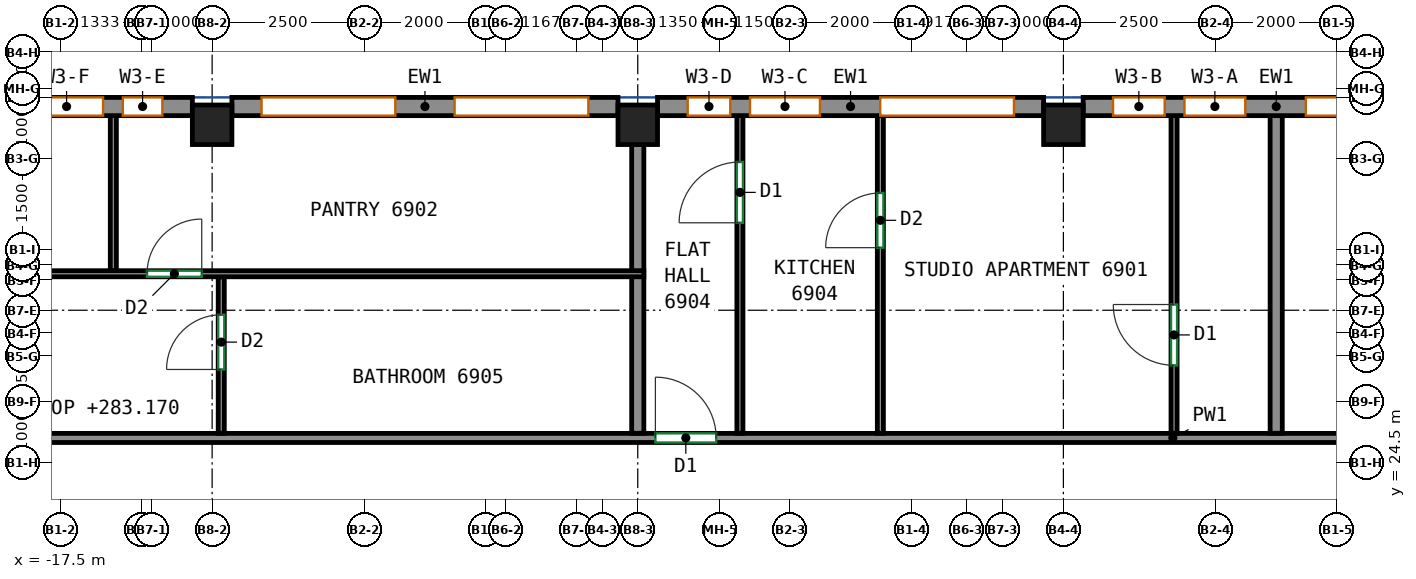
"""IFC4 building model, lengths in metres.
Left out: names, types, materials, properties, quantities, classifications, styles, units other than length and angle.
Written with IfcOpenShell. Run it as: python <this file> out.ifc"""

import sys

from ifc_helpers import new_model, si_unit, direction, frame, frame_2d, origin, origin_2d, place, context, subcontext, project, spatial, rectangle, extrude, source, transform, mapped, element, fill, save


model = new_model("IFC4")
c1 = context("Model", 3, precision=1e-05, world=origin(), true_north=direction((0.0, 1.0)))
c2 = subcontext(c1, "Body", "Model", "MODEL_VIEW")
j1 = project(units=[si_unit("LENGTHUNIT", "METRE"), si_unit("PLANEANGLEUNIT", "RADIAN")], contexts=[c1])
p1 = place(None, origin())
s1 = spatial("IfcSite", under=j1, at=p1, CompositionType="ELEMENT")
p2 = place(p1, origin())
s2 = spatial("IfcBuilding", under=s1, at=p2, CompositionType="ELEMENT")
p3 = place(p2, frame((0.0, 0.0, 280.6)))
s3 = spatial("IfcBuildingStorey", under=s2, at=p3, CompositionType="ELEMENT", Elevation=280.6)
m1 = source(origin(), c2, "Body", "SweptSolid", [
    extrude(rectangle(XDim=0.65, YDim=0.65, at=origin_2d()), origin(), (0.0, 0.0, 1.0), 3.12),
])
for number, where, z_axis, x_axis in (
    (1, (-15.0, 30.05, 0.0), (0.0, 0.0, 1.0), (1.0, 0.0, 0.0)),
    (2, (-8.0, 30.05, 0.0), (0.0, 0.0, 1.0), (1.0, 0.0, 0.0)),
    (3, (-1.0, 30.05, 0.0), (0.0, 0.0, 1.0), (1.0, 0.0, 0.0)),
):
    element("IfcColumn", number, at=place(p3, frame(where, z_axis=z_axis, x_axis=x_axis)), inside=s3, PredefinedType="COLUMN", context=c2, shape_type="MappedRepresentation", body=[
        mapped(m1, transform((0.0, 0.0, 0.0))),
    ])
m2 = source(origin(), c2, "Body", "SweptSolid", [
    extrude(rectangle(XDim=6.35, YDim=0.3, at=frame_2d((3.175, 0.0))), origin(), (0.0, 0.0, 1.0), 3.12),
])
p4 = place(p3, frame((5.675, 30.35, 0.0), z_axis=(0.0, 0.0, 1.0), x_axis=(-1.0, 0.0, 0.0)))
e4 = element("IfcWall", 4, at=p4, inside=s3, PredefinedType="SOLIDWALL", context=c2, shape_type="MappedRepresentation", body=[
    mapped(m2, transform((0.0, 0.0, 0.0))),
])
p5 = place(p4, frame((0.488, 0.0, 0.8)))
e5 = element("IfcOpeningElement", 5, at=p5, cuts=e4, PredefinedType="OPENING", context=c2, shape_type="SweptSolid", body=[
    extrude(rectangle(XDim=2.2, YDim=2.05, at=frame_2d((1.1, 1.025))), frame((0.0, 0.16, 0.0), z_axis=(0.0, -1.0, 0.0), x_axis=(1.0, 0.0, 0.0)), (0.0, 0.0, 1.0), 0.32),
])
p6 = place(p4, frame((3.684, 0.0, 0.8)))
e6 = element("IfcOpeningElement", 6, at=p6, cuts=e4, PredefinedType="OPENING", context=c2, shape_type="SweptSolid", body=[
    extrude(rectangle(XDim=1.0, YDim=2.05, at=frame_2d((0.5, 1.025))), frame((0.0, 0.16, 0.0), z_axis=(0.0, -1.0, 0.0), x_axis=(1.0, 0.0, 0.0)), (0.0, 0.0, 1.0), 0.32),
])
p7 = place(p4, frame((5.009, 0.0, 0.8)))
e7 = element("IfcOpeningElement", 7, at=p7, cuts=e4, PredefinedType="OPENING", context=c2, shape_type="SweptSolid", body=[
    extrude(rectangle(XDim=0.85, YDim=2.05, at=frame_2d((0.425, 1.025))), frame((0.0, 0.16, 0.0), z_axis=(0.0, -1.0, 0.0), x_axis=(1.0, 0.0, 0.0)), (0.0, 0.0, 1.0), 0.32),
])
p8 = place(p3, frame((-1.325, 30.35, 0.0), z_axis=(0.0, 0.0, 1.0), x_axis=(-1.0, 0.0, 0.0)))
e8 = element("IfcWall", 8, at=p8, inside=s3, PredefinedType="SOLIDWALL", context=c2, shape_type="MappedRepresentation", body=[
    mapped(m2, transform((0.0, 0.0, 0.0))),
])
p9 = place(p8, frame((0.488, 0.0, 0.8)))
e9 = element("IfcOpeningElement", 9, at=p9, cuts=e8, PredefinedType="OPENING", context=c2, shape_type="SweptSolid", body=[
    extrude(rectangle(XDim=2.2, YDim=2.05, at=frame_2d((1.1, 1.025))), frame((0.0, 0.16, 0.0), z_axis=(0.0, -1.0, 0.0), x_axis=(1.0, 0.0, 0.0)), (0.0, 0.0, 1.0), 0.32),
])
p10 = place(p8, frame((3.679, 0.0, 0.8)))
e10 = element("IfcOpeningElement", 10, at=p10, cuts=e8, PredefinedType="OPENING", context=c2, shape_type="SweptSolid", body=[
    extrude(rectangle(XDim=1.15, YDim=2.05, at=frame_2d((0.575, 1.025))), frame((0.0, 0.16, 0.0), z_axis=(0.0, -1.0, 0.0), x_axis=(1.0, 0.0, 0.0)), (0.0, 0.0, 1.0), 0.32),
])
p11 = place(p8, frame((5.154, 0.0, 0.8)))
e11 = element("IfcOpeningElement", 11, at=p11, cuts=e8, PredefinedType="OPENING", context=c2, shape_type="SweptSolid", body=[
    extrude(rectangle(XDim=0.7, YDim=2.05, at=frame_2d((0.35, 1.025))), frame((0.0, 0.16, 0.0), z_axis=(0.0, -1.0, 0.0), x_axis=(1.0, 0.0, 0.0)), (0.0, 0.0, 1.0), 0.32),
])
p12 = place(p3, frame((-8.325, 30.35, 0.0), z_axis=(0.0, 0.0, 1.0), x_axis=(-1.0, 0.0, 0.0)))
e12 = element("IfcWall", 12, at=p12, inside=s3, PredefinedType="SOLIDWALL", context=c2, shape_type="MappedRepresentation", body=[
    mapped(m2, transform((0.0, 0.0, 0.0))),
])
p13 = place(p12, frame((0.488, 0.0, 0.8)))
e13 = element("IfcOpeningElement", 13, at=p13, cuts=e12, PredefinedType="OPENING", context=c2, shape_type="SweptSolid", body=[
    extrude(rectangle(XDim=2.2, YDim=2.05, at=frame_2d((1.1, 1.025))), frame((0.0, 0.16, 0.0), z_axis=(0.0, -1.0, 0.0), x_axis=(1.0, 0.0, 0.0)), (0.0, 0.0, 1.0), 0.32),
])
p14 = place(p12, frame((3.663, 0.0, 0.8)))
e14 = element("IfcOpeningElement", 14, at=p14, cuts=e12, PredefinedType="OPENING", context=c2, shape_type="SweptSolid", body=[
    extrude(rectangle(XDim=2.2, YDim=2.05, at=frame_2d((1.1, 1.025))), frame((0.0, 0.16, 0.0), z_axis=(0.0, -1.0, 0.0), x_axis=(1.0, 0.0, 0.0)), (0.0, 0.0, 1.0), 0.32),
])
p15 = place(p3, frame((-15.325, 30.35, 0.0), z_axis=(0.0, 0.0, 1.0), x_axis=(-1.0, 0.0, 0.0)))
e15 = element("IfcWall", 15, at=p15, inside=s3, PredefinedType="SOLIDWALL", context=c2, shape_type="MappedRepresentation", body=[
    mapped(m2, transform((0.0, 0.0, 0.0))),
])
p16 = place(p15, frame((0.494, 0.0, 0.8)))
e16 = element("IfcOpeningElement", 16, at=p16, cuts=e15, PredefinedType="OPENING", context=c2, shape_type="SweptSolid", body=[
    extrude(rectangle(XDim=0.65, YDim=2.05, at=frame_2d((0.325, 1.025))), frame((0.0, 0.16, 0.0), z_axis=(0.0, -1.0, 0.0), x_axis=(1.0, 0.0, 0.0)), (0.0, 0.0, 1.0), 0.32),
])
p17 = place(p15, frame((3.663, 0.0, 0.8)))
e17 = element("IfcOpeningElement", 17, at=p17, cuts=e15, PredefinedType="OPENING", context=c2, shape_type="SweptSolid", body=[
    extrude(rectangle(XDim=2.2, YDim=2.05, at=frame_2d((1.1, 1.025))), frame((0.0, 0.16, 0.0), z_axis=(0.0, -1.0, 0.0), x_axis=(1.0, 0.0, 0.0)), (0.0, 0.0, 1.0), 0.32),
])
p18 = place(p15, frame((1.469, 0.0, 0.8)))
e18 = element("IfcOpeningElement", 18, at=p18, cuts=e15, PredefinedType="OPENING", context=c2, shape_type="SweptSolid", body=[
    extrude(rectangle(XDim=1.2, YDim=2.05, at=frame_2d((0.6, 1.025))), frame((0.0, 0.16, 0.0), z_axis=(0.0, -1.0, 0.0), x_axis=(1.0, 0.0, 0.0)), (0.0, 0.0, 1.0), 0.32),
])
p19 = place(p3, frame((-19.075, 24.9, 0.0), z_axis=(0.0, 0.0, 1.0), x_axis=(1.0, 0.0, 0.0)))
e19 = element("IfcWall", 19, at=p19, inside=s3, PredefinedType="PARTITIONING", context=c2, shape_type="SweptSolid", body=[
    extrude(rectangle(XDim=39.75, YDim=0.15, at=frame_2d((19.875, 0.0))), origin(), (0.0, 0.0, 1.0), 3.12),
])
p20 = place(p19, frame((11.365, 0.0, 0.0)))
e20 = element("IfcOpeningElement", 20, at=p20, cuts=e19, PredefinedType="OPENING", context=c2, shape_type="SweptSolid", body=[
    extrude(rectangle(XDim=1.0, YDim=2.1, at=frame_2d((0.5, 1.05))), frame((0.0, 0.085, 0.0), z_axis=(0.0, -1.0, 0.0), x_axis=(1.0, 0.0, 0.0)), (0.0, 0.0, 1.0), 0.17),
])
p21 = place(p19, frame((33.379, 0.0, 0.0)))
e21 = element("IfcOpeningElement", 21, at=p21, cuts=e19, PredefinedType="OPENING", context=c2, shape_type="SweptSolid", body=[
    extrude(rectangle(XDim=0.9, YDim=2.1, at=frame_2d((0.45, 1.05))), frame((0.0, 0.085, 0.0), z_axis=(0.0, -1.0, 0.0), x_axis=(1.0, 0.0, 0.0)), (0.0, 0.0, 1.0), 0.17),
])
p22 = place(p3, frame((2.5, 30.25, 0.0), z_axis=(0.0, 0.0, 1.0), x_axis=(0.0, -1.0, 0.0)))
e22 = element("IfcWall", 22, at=p22, inside=s3, PredefinedType="PARTITIONING", context=c2, shape_type="SweptSolid", body=[
    extrude(rectangle(XDim=5.273, YDim=0.2, at=frame_2d((2.636, 0.0))), origin(), (0.0, 0.0, 1.0), 3.12),
])
p23 = place(p3, frame((-6.32, 24.977, 0.0), z_axis=(0.0, 0.0, 1.0), x_axis=(0.0, 1.0, 0.0)))
e23 = element("IfcWall", 23, at=p23, inside=s3, PredefinedType="PARTITIONING", context=c2, shape_type="SweptSolid", body=[
    extrude(rectangle(XDim=5.273, YDim=0.1, at=frame_2d((2.636, 0.0))), origin(), (0.0, 0.0, 1.0), 3.12),
])
p24 = place(p23, frame((3.461, 0.0, 0.0)))
e24 = element("IfcOpeningElement", 24, at=p24, cuts=e23, PredefinedType="OPENING", context=c2, shape_type="SweptSolid", body=[
    extrude(rectangle(XDim=1.0, YDim=2.1, at=frame_2d((0.5, 1.05))), frame((0.0, 0.06, 0.0), z_axis=(0.0, -1.0, 0.0), x_axis=(1.0, 0.0, 0.0)), (0.0, 0.0, 1.0), 0.12),
])
p25 = place(p3, frame((-8.0, 24.977, 0.0), z_axis=(0.0, 0.0, 1.0), x_axis=(0.0, 1.0, 0.0)))
e25 = element("IfcWall", 25, at=p25, inside=s3, PredefinedType="PARTITIONING", context=c2, shape_type="SweptSolid", body=[
    extrude(rectangle(XDim=2.583, YDim=0.2, at=frame_2d((1.292, 0.0))), origin(), (0.0, 0.0, 1.0), 3.12),
])
p26 = place(p3, frame((-8.0, 27.642, 0.0), z_axis=(0.0, 0.0, 1.0), x_axis=(0.0, 1.0, 0.0)))
e26 = element("IfcWall", 26, at=p26, inside=s3, PredefinedType="PARTITIONING", context=c2, shape_type="SweptSolid", body=[
    extrude(rectangle(XDim=2.083, YDim=0.2, at=frame_2d((1.042, 0.0))), origin(), (0.0, 0.0, 1.0), 3.12),
])
p27 = place(p3, frame((-4.01, 24.977, 0.0), z_axis=(0.0, 0.0, 1.0), x_axis=(0.0, 1.0, 0.0)))
e27 = element("IfcWall", 27, at=p27, inside=s3, PredefinedType="PARTITIONING", context=c2, shape_type="SweptSolid", body=[
    extrude(rectangle(XDim=5.273, YDim=0.1, at=frame_2d((2.636, 0.0))), origin(), (0.0, 0.0, 1.0), 3.12),
])
p28 = place(p27, frame((3.052, 0.0, 0.0)))
e28 = element("IfcOpeningElement", 28, at=p28, cuts=e27, PredefinedType="OPENING", context=c2, shape_type="SweptSolid", body=[
    extrude(rectangle(XDim=0.9, YDim=2.1, at=frame_2d((0.45, 1.05))), frame((0.0, 0.06, 0.0), z_axis=(0.0, -1.0, 0.0), x_axis=(1.0, 0.0, 0.0)), (0.0, 0.0, 1.0), 0.12),
])
p29 = place(p3, frame((0.82, 24.977, 0.0), z_axis=(0.0, 0.0, 1.0), x_axis=(0.0, 1.0, 0.0)))
e29 = element("IfcWall", 29, at=p29, inside=s3, PredefinedType="PARTITIONING", context=c2, shape_type="SweptSolid", body=[
    extrude(rectangle(XDim=5.273, YDim=0.1, at=frame_2d((2.636, 0.0))), origin(), (0.0, 0.0, 1.0), 3.12),
])
p30 = place(p29, frame((1.117, 0.0, 0.0)))
e30 = element("IfcOpeningElement", 30, at=p30, cuts=e29, PredefinedType="OPENING", context=c2, shape_type="SweptSolid", body=[
    extrude(rectangle(XDim=1.0, YDim=2.1, at=frame_2d((0.5, 1.05))), frame((0.0, 0.06, 0.0), z_axis=(0.0, -1.0, 0.0), x_axis=(1.0, 0.0, 0.0)), (0.0, 0.0, 1.0), 0.12),
])
p31 = place(p3, frame((-14.85, 24.977, 0.0), z_axis=(0.0, 0.0, 1.0), x_axis=(0.0, 1.0, 0.0)))
e31 = element("IfcWall", 31, at=p31, inside=s3, PredefinedType="PARTITIONING", context=c2, shape_type="SweptSolid", body=[
    extrude(rectangle(XDim=2.573, YDim=0.1, at=frame_2d((1.287, 0.0))), origin(), (0.0, 0.0, 1.0), 3.12),
])
p32 = place(p31, frame((1.049, 0.0, 0.0)))
e32 = element("IfcOpeningElement", 32, at=p32, cuts=e31, PredefinedType="OPENING", context=c2, shape_type="SweptSolid", body=[
    extrude(rectangle(XDim=0.9, YDim=2.1, at=frame_2d((0.45, 1.05))), frame((0.0, 0.06, 0.0), z_axis=(0.0, -1.0, 0.0), x_axis=(1.0, 0.0, 0.0)), (0.0, 0.0, 1.0), 0.12),
])
p33 = place(p3, frame((-21.75, 27.6, 0.0), z_axis=(0.0, 0.0, 1.0), x_axis=(1.0, 0.0, 0.0)))
e33 = element("IfcWall", 33, at=p33, inside=s3, PredefinedType="PARTITIONING", context=c2, shape_type="SweptSolid", body=[
    extrude(rectangle(XDim=13.85, YDim=0.1, at=frame_2d((6.925, 0.0))), origin(), (0.0, 0.0, 1.0), 3.12),
])
p34 = place(p33, frame((5.679, 0.0, 0.0)))
e34 = element("IfcOpeningElement", 34, at=p34, cuts=e33, PredefinedType="OPENING", context=c2, shape_type="SweptSolid", body=[
    extrude(rectangle(XDim=0.9, YDim=2.1, at=frame_2d((0.45, 1.05))), frame((0.0, 0.06, 0.0), z_axis=(0.0, -1.0, 0.0), x_axis=(1.0, 0.0, 0.0)), (0.0, 0.0, 1.0), 0.12),
])
p35 = place(p3, frame((-16.625, 27.652, 0.0), z_axis=(0.0, 0.0, 1.0), x_axis=(0.0, 1.0, 0.0)))
e35 = element("IfcWall", 35, at=p35, inside=s3, PredefinedType="PARTITIONING", context=c2, shape_type="SweptSolid", body=[
    extrude(rectangle(XDim=2.598, YDim=0.1, at=frame_2d((1.299, 0.0))), origin(), (0.0, 0.0, 1.0), 3.12),
])
p36 = place(p5, origin())
e36 = element("IfcWindow", 36, at=p36, inside=s3, PartitioningType="SINGLE_PANEL", PredefinedType="WINDOW", context=c2, shape_type="SweptSolid", body=[
    extrude(rectangle(XDim=2.2, YDim=2.05, at=frame_2d((1.1, 1.025))), frame((0.0, 0.03, 0.0), z_axis=(0.0, -1.0, 0.0), x_axis=(1.0, 0.0, 0.0)), (0.0, 0.0, 1.0), 0.06),
])
fill(e5, e36)
p37 = place(p6, origin())
e37 = element("IfcWindow", 37, at=p37, inside=s3, PartitioningType="SINGLE_PANEL", PredefinedType="WINDOW", context=c2, shape_type="SweptSolid", body=[
    extrude(rectangle(XDim=1.0, YDim=2.05, at=frame_2d((0.5, 1.025))), frame((0.0, 0.03, 0.0), z_axis=(0.0, -1.0, 0.0), x_axis=(1.0, 0.0, 0.0)), (0.0, 0.0, 1.0), 0.06),
])
fill(e6, e37)
p38 = place(p9, origin())
e38 = element("IfcWindow", 38, at=p38, inside=s3, PartitioningType="SINGLE_PANEL", PredefinedType="WINDOW", context=c2, shape_type="SweptSolid", body=[
    extrude(rectangle(XDim=2.2, YDim=2.05, at=frame_2d((1.1, 1.025))), frame((0.0, 0.03, 0.0), z_axis=(0.0, -1.0, 0.0), x_axis=(1.0, 0.0, 0.0)), (0.0, 0.0, 1.0), 0.06),
])
fill(e9, e38)
p39 = place(p10, origin())
e39 = element("IfcWindow", 39, at=p39, inside=s3, PartitioningType="SINGLE_PANEL", PredefinedType="WINDOW", context=c2, shape_type="SweptSolid", body=[
    extrude(rectangle(XDim=1.15, YDim=2.05, at=frame_2d((0.575, 1.025))), frame((0.0, 0.03, 0.0), z_axis=(0.0, -1.0, 0.0), x_axis=(1.0, 0.0, 0.0)), (0.0, 0.0, 1.0), 0.06),
])
fill(e10, e39)
p40 = place(p13, origin())
e40 = element("IfcWindow", 40, at=p40, inside=s3, PartitioningType="SINGLE_PANEL", PredefinedType="WINDOW", context=c2, shape_type="SweptSolid", body=[
    extrude(rectangle(XDim=2.2, YDim=2.05, at=frame_2d((1.1, 1.025))), frame((0.0, 0.03, 0.0), z_axis=(0.0, -1.0, 0.0), x_axis=(1.0, 0.0, 0.0)), (0.0, 0.0, 1.0), 0.06),
])
fill(e13, e40)
p41 = place(p14, origin())
e41 = element("IfcWindow", 41, at=p41, inside=s3, PartitioningType="SINGLE_PANEL", PredefinedType="WINDOW", context=c2, shape_type="SweptSolid", body=[
    extrude(rectangle(XDim=2.2, YDim=2.05, at=frame_2d((1.1, 1.025))), frame((0.0, 0.03, 0.0), z_axis=(0.0, -1.0, 0.0), x_axis=(1.0, 0.0, 0.0)), (0.0, 0.0, 1.0), 0.06),
])
fill(e14, e41)
p42 = place(p16, origin())
e42 = element("IfcWindow", 42, at=p42, inside=s3, PartitioningType="SINGLE_PANEL", PredefinedType="WINDOW", context=c2, shape_type="SweptSolid", body=[
    extrude(rectangle(XDim=0.65, YDim=2.05, at=frame_2d((0.325, 1.025))), frame((0.0, 0.03, 0.0), z_axis=(0.0, -1.0, 0.0), x_axis=(1.0, 0.0, 0.0)), (0.0, 0.0, 1.0), 0.06),
])
fill(e16, e42)
p43 = place(p20, origin())
e43 = element("IfcDoor", 43, at=p43, inside=s3, OperationType="SINGLE_SWING_LEFT", PredefinedType="DOOR", context=c2, shape_type="SweptSolid", body=[
    extrude(rectangle(XDim=1.0, YDim=2.1, at=frame_2d((0.5, 1.05))), frame((0.0, 0.025, 0.0), z_axis=(0.0, -1.0, 0.0), x_axis=(1.0, 0.0, 0.0)), (0.0, 0.0, 1.0), 0.05),
])
fill(e20, e43)
p44 = place(p32, origin())
e44 = element("IfcDoor", 44, at=p44, inside=s3, OperationType="SINGLE_SWING_LEFT", PredefinedType="DOOR", context=c2, shape_type="SweptSolid", body=[
    extrude(rectangle(XDim=0.9, YDim=2.1, at=frame_2d((0.45, 1.05))), frame((0.0, 0.025, 0.0), z_axis=(0.0, -1.0, 0.0), x_axis=(1.0, 0.0, 0.0)), (0.0, 0.0, 1.0), 0.05),
])
fill(e32, e44)
p45 = place(p30, origin())
e45 = element("IfcDoor", 45, at=p45, inside=s3, OperationType="SINGLE_SWING_RIGHT", PredefinedType="DOOR", context=c2, shape_type="SweptSolid", body=[
    extrude(rectangle(XDim=1.0, YDim=2.1, at=frame_2d((0.5, 1.05))), frame((0.0, 0.025, 0.0), z_axis=(0.0, -1.0, 0.0), x_axis=(1.0, 0.0, 0.0)), (0.0, 0.0, 1.0), 0.05),
])
fill(e30, e45)
p46 = place(p34, origin())
e46 = element("IfcDoor", 46, at=p46, inside=s3, OperationType="SINGLE_SWING_RIGHT", PredefinedType="DOOR", context=c2, shape_type="SweptSolid", body=[
    extrude(rectangle(XDim=0.9, YDim=2.1, at=frame_2d((0.45, 1.05))), frame((0.0, 0.025, 0.0), z_axis=(0.0, -1.0, 0.0), x_axis=(1.0, 0.0, 0.0)), (0.0, 0.0, 1.0), 0.05),
])
fill(e34, e46)
p47 = place(p28, origin())
e47 = element("IfcDoor", 47, at=p47, inside=s3, OperationType="SINGLE_SWING_LEFT", PredefinedType="DOOR", context=c2, shape_type="SweptSolid", body=[
    extrude(rectangle(XDim=0.9, YDim=2.1, at=frame_2d((0.45, 1.05))), frame((0.0, 0.025, 0.0), z_axis=(0.0, -1.0, 0.0), x_axis=(1.0, 0.0, 0.0)), (0.0, 0.0, 1.0), 0.05),
])
fill(e28, e47)
p48 = place(p24, origin())
e48 = element("IfcDoor", 48, at=p48, inside=s3, OperationType="SINGLE_SWING_LEFT", PredefinedType="DOOR", context=c2, shape_type="SweptSolid", body=[
    extrude(rectangle(XDim=1.0, YDim=2.1, at=frame_2d((0.5, 1.05))), frame((0.0, 0.025, 0.0), z_axis=(0.0, -1.0, 0.0), x_axis=(1.0, 0.0, 0.0)), (0.0, 0.0, 1.0), 0.05),
])
fill(e24, e48)
p49 = place(p7, origin())
e49 = element("IfcWindow", 49, at=p49, inside=s3, PartitioningType="SINGLE_PANEL", PredefinedType="WINDOW", context=c2, shape_type="SweptSolid", body=[
    extrude(rectangle(XDim=0.85, YDim=2.05, at=frame_2d((0.425, 1.025))), frame((0.0, 0.03, 0.0), z_axis=(0.0, -1.0, 0.0), x_axis=(1.0, 0.0, 0.0)), (0.0, 0.0, 1.0), 0.06),
])
fill(e7, e49)
p50 = place(p11, origin())
e50 = element("IfcWindow", 50, at=p50, inside=s3, PartitioningType="SINGLE_PANEL", PredefinedType="WINDOW", context=c2, shape_type="SweptSolid", body=[
    extrude(rectangle(XDim=0.7, YDim=2.05, at=frame_2d((0.35, 1.025))), frame((0.0, 0.03, 0.0), z_axis=(0.0, -1.0, 0.0), x_axis=(1.0, 0.0, 0.0)), (0.0, 0.0, 1.0), 0.06),
])
fill(e11, e50)
p51 = place(p18, origin())
e51 = element("IfcWindow", 51, at=p51, inside=s3, PartitioningType="SINGLE_PANEL", PredefinedType="WINDOW", context=c2, shape_type="SweptSolid", body=[
    extrude(rectangle(XDim=1.2, YDim=2.05, at=frame_2d((0.6, 1.025))), frame((0.0, 0.03, 0.0), z_axis=(0.0, -1.0, 0.0), x_axis=(1.0, 0.0, 0.0)), (0.0, 0.0, 1.0), 0.06),
])
fill(e18, e51)
save(model, sys.argv[1])
